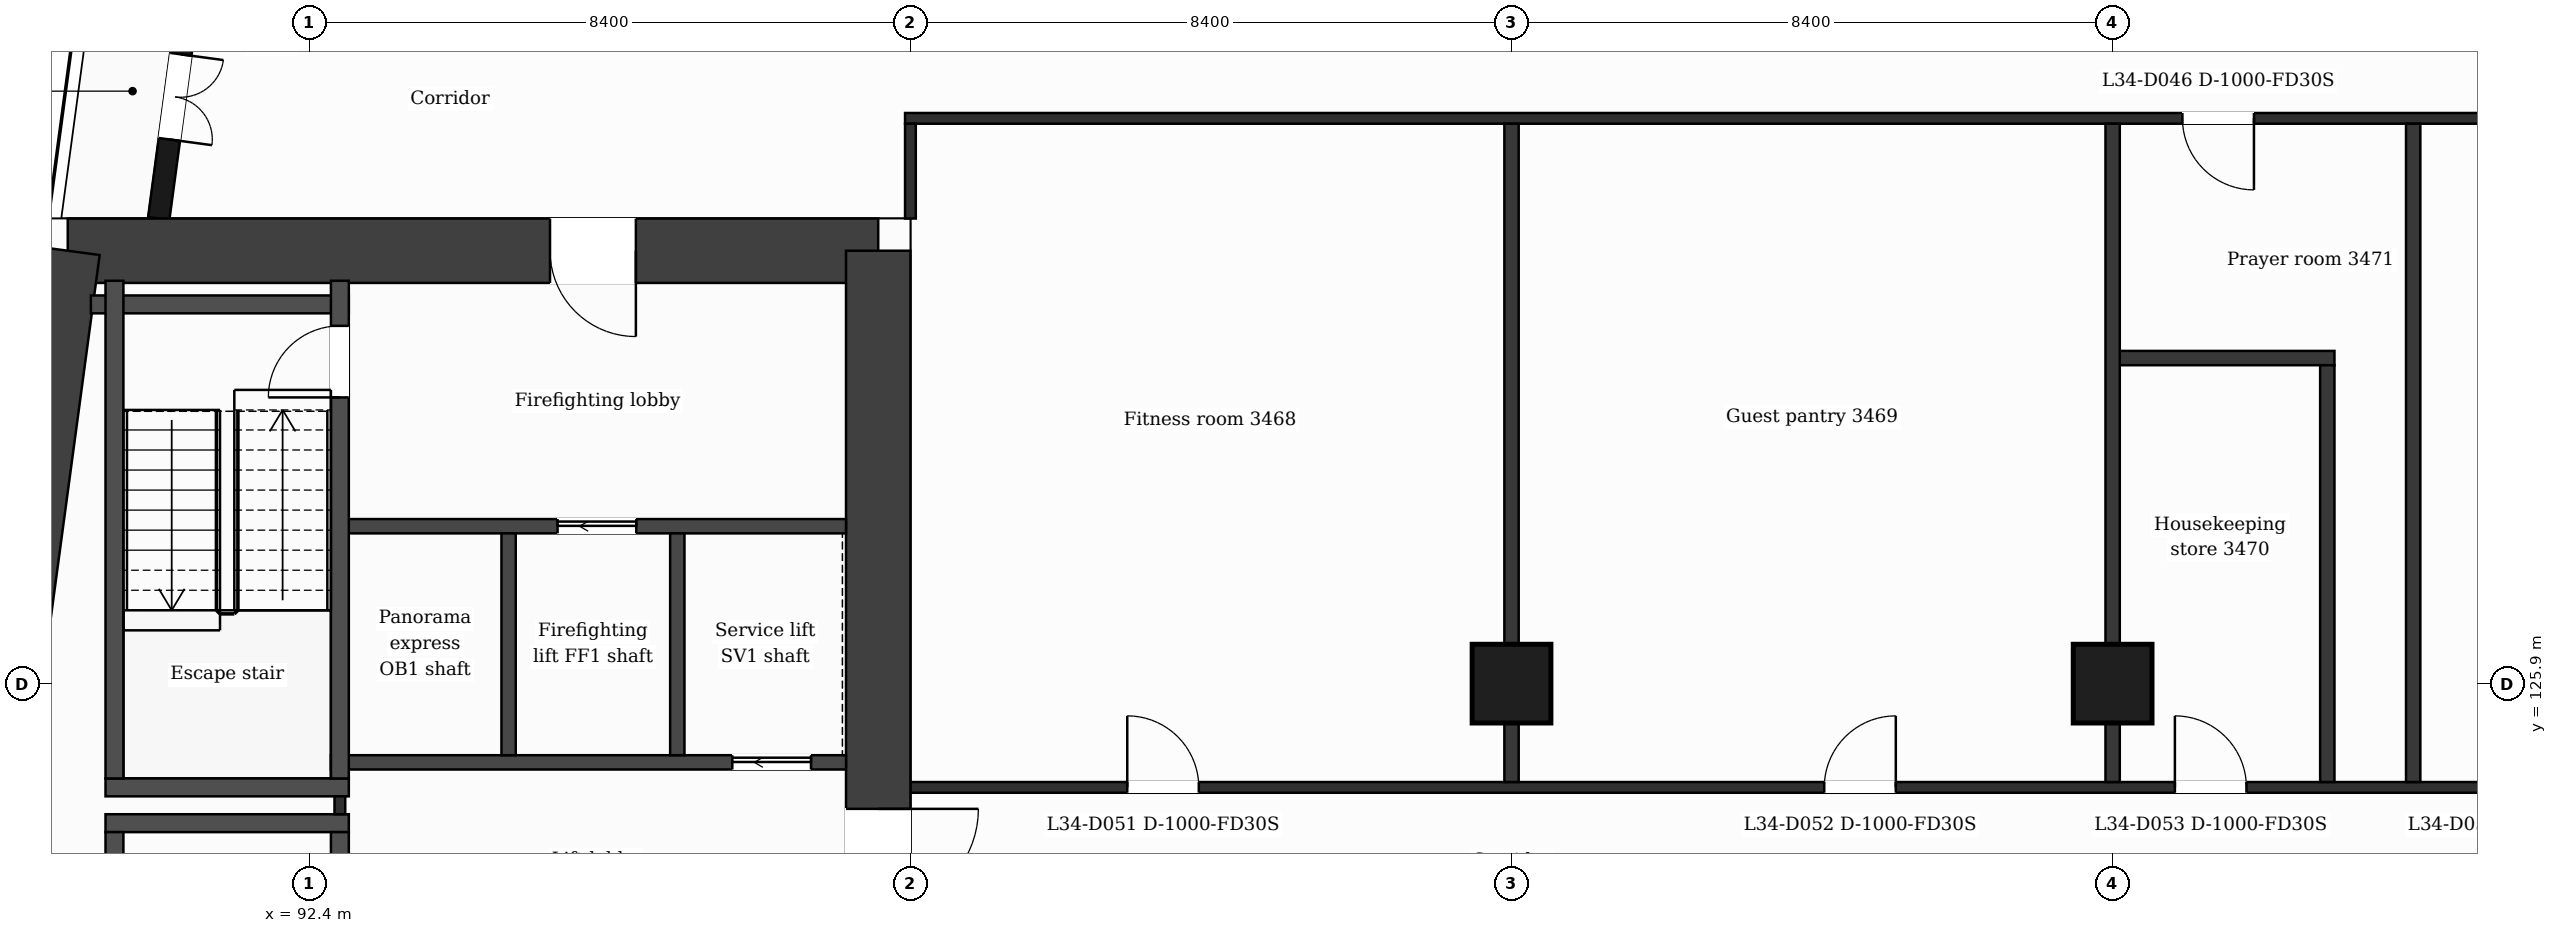
"""IFC4 building model, lengths in metres.
Left out: names, types, materials, properties, quantities, classifications, styles, units other than length and angle.
Written with IfcOpenShell. Run it as: python <this file> out.ifc"""

import sys

from ifc_helpers import new_model, si_unit, direction, frame, frame_2d, origin, origin_2d, place, context, subcontext, project, spatial, rectangle, extrude, element, fill, save


model = new_model("IFC4")
c1 = context("Model", 3, precision=1e-05, world=origin(), true_north=direction((0.0, 1.0)))
c2 = subcontext(c1, "Body", "Model", "MODEL_VIEW")
j1 = project(units=[si_unit("LENGTHUNIT", "METRE"), si_unit("PLANEANGLEUNIT", "RADIAN")], contexts=[c1])
p1 = place(None, origin())
s1 = spatial("IfcSite", under=j1, at=p1, CompositionType="ELEMENT")
p2 = place(p1, origin())
s2 = spatial("IfcBuilding", under=s1, at=p2, CompositionType="ELEMENT")
p3 = place(p2, frame((0.0, 0.0, 147.8)))
s3 = spatial("IfcBuildingStorey", under=s2, at=p3, CompositionType="ELEMENT", Elevation=147.8)
p4 = place(p3, frame((89.024, 131.95, 0.0), z_axis=(0.0, 0.0, 1.0), x_axis=(1.0, 0.0, 0.0)))
e1 = element("IfcWall", 1, at=p4, inside=s3, PredefinedType="SHEAR", context=c2, shape_type="SweptSolid", body=[
    extrude(rectangle(XDim=11.326, YDim=0.9, at=frame_2d((5.663, 0.0))), origin(), (0.0, 0.0, 1.0), 3.7),
])
p5 = place(p4, frame((6.739, 0.0, 0.0)))
e2 = element("IfcOpeningElement", 2, at=p5, cuts=e1, PredefinedType="OPENING", context=c2, shape_type="SweptSolid", body=[
    extrude(rectangle(XDim=1.2, YDim=2.1, at=frame_2d((0.6, 1.05))), frame((0.0, 0.46, 0.0), z_axis=(0.0, -1.0, 0.0), x_axis=(1.0, 0.0, 0.0)), (0.0, 0.0, 1.0), 0.92),
])
p6 = place(p3, frame((100.35, 131.95, 0.0), z_axis=(0.0, 0.0, 1.0), x_axis=(0.0, -1.0, 0.0)))
e3 = element("IfcWall", 3, at=p6, inside=s3, PredefinedType="SHEAR", context=c2, shape_type="SweptSolid", body=[
    extrude(rectangle(XDim=21.1, YDim=0.9, at=frame_2d((10.55, 0.0))), origin(), (0.0, 0.0, 1.0), 3.7),
])
p7 = place(p6, frame((7.8, 0.0, 0.0)))
e4 = element("IfcOpeningElement", 4, at=p7, cuts=e3, PredefinedType="OPENING", context=c2, shape_type="SweptSolid", body=[
    extrude(rectangle(XDim=1.4, YDim=2.1, at=frame_2d((0.7, 1.05))), frame((0.0, 0.46, 0.0), z_axis=(0.0, -1.0, 0.0), x_axis=(1.0, 0.0, 0.0)), (0.0, 0.0, 1.0), 0.92),
])
p8 = place(p3, frame((86.184, 110.85, 0.0), z_axis=(0.0, 0.0, 1.0), x_axis=(0.133410495943, 0.991060865725, 0.0)))
e5 = element("IfcWall", 5, at=p8, inside=s3, PredefinedType="SHEAR", context=c2, shape_type="SweptSolid", body=[
    extrude(rectangle(XDim=21.29, YDim=0.9, at=frame_2d((10.645, 0.0))), origin(), (0.0, 0.0, 1.0), 3.7),
])
for number, where, z_axis, x_axis in (
    (6, (109.2, 125.9, 0.0), (0.0, 0.0, 1.0), (1.0, 0.0, 0.0)),
    (7, (117.6, 125.9, 0.0), (0.0, 0.0, 1.0), (1.0, 0.0, 0.0)),
):
    element("IfcColumn", number, at=place(p3, frame(where, z_axis=z_axis, x_axis=x_axis)), inside=s3, PredefinedType="COLUMN", context=c2, shape_type="SweptSolid", body=[
        extrude(rectangle(XDim=1.1, YDim=1.1, at=origin_2d()), origin(), (0.0, 0.0, 1.0), 3.7),
    ])
p9 = place(p3, frame((91.177, 138.95, 0.0), z_axis=(0.0, 0.0, 1.0), x_axis=(-0.133426664613, -0.991058689065, 0.0)))
e8 = element("IfcWall", 8, at=p9, inside=s3, PredefinedType="SOLIDWALL", context=c2, shape_type="SweptSolid", body=[
    extrude(rectangle(XDim=6.609, YDim=0.3, at=frame_2d((3.305, 0.0))), origin(), (0.0, 0.0, 1.0), 3.38),
])
p10 = place(p9, frame((1.039, 0.0, 0.9)))
e9 = element("IfcOpeningElement", 9, at=p10, cuts=e8, PredefinedType="OPENING", context=c2, shape_type="SweptSolid", body=[
    extrude(rectangle(XDim=1.2, YDim=2.1, at=frame_2d((0.6, 1.05))), frame((0.0, 0.16, 0.0), z_axis=(0.0, -1.0, 0.0), x_axis=(1.0, 0.0, 0.0)), (0.0, 0.0, 1.0), 0.32),
])
p11 = place(p9, frame((4.294, 0.0, 0.0)))
e10 = element("IfcOpeningElement", 10, at=p11, cuts=e8, PredefinedType="OPENING", context=c2, shape_type="SweptSolid", body=[
    extrude(rectangle(XDim=1.2, YDim=2.4, at=frame_2d((0.6, 1.2))), frame((0.0, 0.16, 0.0), z_axis=(0.0, -1.0, 0.0), x_axis=(1.0, 0.0, 0.0)), (0.0, 0.0, 1.0), 0.32),
])
for number, where, z_axis, x_axis in (
    (11, (89.552, 123.95, 0.0), (0.0, 0.0, 1.0), (1.0, 0.0, 0.0)),
    (12, (89.552, 124.45, 0.0), (0.0, 0.0, 1.0), (1.0, 0.0, 0.0)),
):
    element("IfcWall", number, at=place(p3, frame(where, z_axis=z_axis, x_axis=x_axis)), inside=s3, PredefinedType="PARTITIONING", context=c2, shape_type="SweptSolid", body=[
        extrude(rectangle(XDim=3.4, YDim=0.25, at=frame_2d((1.7, 0.0))), origin(), (0.0, 0.0, 1.0), 3.38),
    ])
p12 = place(p3, frame((100.8, 124.45, 0.0), z_axis=(0.0, 0.0, 1.0), x_axis=(1.0, 0.0, 0.0)))
e13 = element("IfcWall", 13, at=p12, inside=s3, PredefinedType="PARTITIONING", context=c2, shape_type="SweptSolid", body=[
    extrude(rectangle(XDim=25.2, YDim=0.15, at=frame_2d((12.6, 0.0))), origin(), (0.0, 0.0, 1.0), 3.38),
])
p13 = place(p12, frame((3.03, 0.0, 0.0)))
e14 = element("IfcOpeningElement", 14, at=p13, cuts=e13, PredefinedType="OPENING", context=c2, shape_type="SweptSolid", body=[
    extrude(rectangle(XDim=1.0, YDim=2.1, at=frame_2d((0.5, 1.05))), frame((0.0, 0.085, 0.0), z_axis=(0.0, -1.0, 0.0), x_axis=(1.0, 0.0, 0.0)), (0.0, 0.0, 1.0), 0.17),
])
p14 = place(p12, frame((12.77, 0.0, 0.0)))
e15 = element("IfcOpeningElement", 15, at=p14, cuts=e13, PredefinedType="OPENING", context=c2, shape_type="SweptSolid", body=[
    extrude(rectangle(XDim=1.0, YDim=2.1, at=frame_2d((0.5, 1.05))), frame((0.0, 0.085, 0.0), z_axis=(0.0, -1.0, 0.0), x_axis=(1.0, 0.0, 0.0)), (0.0, 0.0, 1.0), 0.17),
])
p15 = place(p12, frame((17.67, 0.0, 0.0)))
e16 = element("IfcOpeningElement", 16, at=p15, cuts=e13, PredefinedType="OPENING", context=c2, shape_type="SweptSolid", body=[
    extrude(rectangle(XDim=1.0, YDim=2.1, at=frame_2d((0.5, 1.05))), frame((0.0, 0.085, 0.0), z_axis=(0.0, -1.0, 0.0), x_axis=(1.0, 0.0, 0.0)), (0.0, 0.0, 1.0), 0.17),
])
p16 = place(p12, frame((22.35, 0.0, 0.0)))
e17 = element("IfcOpeningElement", 17, at=p16, cuts=e13, PredefinedType="OPENING", context=c2, shape_type="SweptSolid", body=[
    extrude(rectangle(XDim=1.0, YDim=2.1, at=frame_2d((0.5, 1.05))), frame((0.0, 0.085, 0.0), z_axis=(0.0, -1.0, 0.0), x_axis=(1.0, 0.0, 0.0)), (0.0, 0.0, 1.0), 0.17),
])
p17 = place(p3, frame((92.702, 124.8, 0.0), z_axis=(0.0, 0.0, 1.0), x_axis=(1.0, 0.0, 0.0)))
e18 = element("IfcWall", 18, at=p17, inside=s3, PredefinedType="PARTITIONING", context=c2, shape_type="SweptSolid", body=[
    extrude(rectangle(XDim=7.198, YDim=0.2, at=frame_2d((3.599, 0.0))), origin(), (0.0, 0.0, 1.0), 3.38),
])
p18 = place(p17, frame((5.609, 0.0, 0.0)))
e19 = element("IfcOpeningElement", 19, at=p18, cuts=e18, PredefinedType="OPENING", context=c2, shape_type="SweptSolid", body=[
    extrude(rectangle(XDim=1.1, YDim=2.1, at=frame_2d((0.55, 1.05))), frame((0.0, 0.11, 0.0), z_axis=(0.0, -1.0, 0.0), x_axis=(1.0, 0.0, 0.0)), (0.0, 0.0, 1.0), 0.22),
])
p19 = place(p3, frame((92.827, 128.1, 0.0), z_axis=(0.0, 0.0, 1.0), x_axis=(1.0, 0.0, 0.0)))
e20 = element("IfcWall", 20, at=p19, inside=s3, PredefinedType="PARTITIONING", context=c2, shape_type="SweptSolid", body=[
    extrude(rectangle(XDim=7.073, YDim=0.2, at=frame_2d((3.537, 0.0))), origin(), (0.0, 0.0, 1.0), 3.38),
])
p20 = place(p19, frame((3.042, 0.0, 0.0)))
e21 = element("IfcOpeningElement", 21, at=p20, cuts=e20, PredefinedType="OPENING", context=c2, shape_type="SweptSolid", body=[
    extrude(rectangle(XDim=1.1, YDim=2.1, at=frame_2d((0.55, 1.05))), frame((0.0, 0.11, 0.0), z_axis=(0.0, -1.0, 0.0), x_axis=(1.0, 0.0, 0.0)), (0.0, 0.0, 1.0), 0.22),
])
p21 = place(p3, frame((117.6, 130.45, 0.0), z_axis=(0.0, 0.0, 1.0), x_axis=(1.0, 0.0, 0.0)))
e22 = element("IfcWall", 22, at=p21, inside=s3, PredefinedType="PARTITIONING", context=c2, shape_type="SweptSolid", body=[
    extrude(rectangle(XDim=3.1, YDim=0.2, at=frame_2d((1.55, 0.0))), origin(), (0.0, 0.0, 1.0), 3.38),
])
p22 = place(p3, frame((89.347, 131.2, 0.0), z_axis=(0.0, 0.0, 1.0), x_axis=(1.0, 0.0, 0.0)))
e23 = element("IfcWall", 23, at=p22, inside=s3, PredefinedType="PARTITIONING", context=c2, shape_type="SweptSolid", body=[
    extrude(rectangle(XDim=3.604, YDim=0.25, at=frame_2d((1.802, 0.0))), origin(), (0.0, 0.0, 1.0), 3.38),
])
p23 = place(p3, frame((100.725, 133.8, 0.0), z_axis=(0.0, 0.0, 1.0), x_axis=(1.0, 0.0, 0.0)))
e24 = element("IfcWall", 24, at=p23, inside=s3, PredefinedType="PARTITIONING", context=c2, shape_type="SweptSolid", body=[
    extrude(rectangle(XDim=25.35, YDim=0.15, at=frame_2d((12.675, 0.0))), origin(), (0.0, 0.0, 1.0), 3.38),
])
p24 = place(p23, frame((17.85, 0.0, 0.0)))
e25 = element("IfcOpeningElement", 25, at=p24, cuts=e24, PredefinedType="OPENING", context=c2, shape_type="SweptSolid", body=[
    extrude(rectangle(XDim=1.0, YDim=2.1, at=frame_2d((0.5, 1.05))), frame((0.0, 0.085, 0.0), z_axis=(0.0, -1.0, 0.0), x_axis=(1.0, 0.0, 0.0)), (0.0, 0.0, 1.0), 0.17),
])
p25 = place(p3, frame((89.677, 116.87, 0.0), z_axis=(0.0, 0.0, 1.0), x_axis=(0.0, 1.0, 0.0)))
e26 = element("IfcWall", 26, at=p25, inside=s3, PredefinedType="PARTITIONING", context=c2, shape_type="SweptSolid", body=[
    extrude(rectangle(XDim=6.955, YDim=0.25, at=frame_2d((3.478, 0.0))), origin(), (0.0, 0.0, 1.0), 3.38),
])
p26 = place(p3, frame((89.677, 124.575, 0.0), z_axis=(0.0, 0.0, 1.0), x_axis=(0.0, 1.0, 0.0)))
e27 = element("IfcWall", 27, at=p26, inside=s3, PredefinedType="PARTITIONING", context=c2, shape_type="SweptSolid", body=[
    extrude(rectangle(XDim=6.955, YDim=0.25, at=frame_2d((3.478, 0.0))), origin(), (0.0, 0.0, 1.0), 3.38),
])
p27 = place(p3, frame((92.827, 124.075, 0.0), z_axis=(0.0, 0.0, 1.0), x_axis=(0.0, 1.0, 0.0)))
e28 = element("IfcWall", 28, at=p27, inside=s3, PredefinedType="PARTITIONING", context=c2, shape_type="SweptSolid", body=[
    extrude(rectangle(XDim=0.25, YDim=0.15, at=frame_2d((0.125, 0.0))), origin(), (0.0, 0.0, 1.0), 3.38),
])
p28 = place(p3, frame((92.827, 116.87, 0.0), z_axis=(0.0, 0.0, 1.0), x_axis=(0.0, 1.0, 0.0)))
e29 = element("IfcWall", 29, at=p28, inside=s3, PredefinedType="PARTITIONING", context=c2, shape_type="SweptSolid", body=[
    extrude(rectangle(XDim=6.955, YDim=0.25, at=frame_2d((3.478, 0.0))), origin(), (0.0, 0.0, 1.0), 3.38),
])
p29 = place(p28, frame((5.655, 0.0, 0.0)))
e30 = element("IfcOpeningElement", 30, at=p29, cuts=e29, PredefinedType="OPENING", context=c2, shape_type="SweptSolid", body=[
    extrude(rectangle(XDim=0.95, YDim=2.1, at=frame_2d((0.475, 1.05))), frame((0.0, 0.135, 0.0), z_axis=(0.0, -1.0, 0.0), x_axis=(1.0, 0.0, 0.0)), (0.0, 0.0, 1.0), 0.27),
])
p30 = place(p3, frame((92.827, 124.575, 0.0), z_axis=(0.0, 0.0, 1.0), x_axis=(0.0, 1.0, 0.0)))
e31 = element("IfcWall", 31, at=p30, inside=s3, PredefinedType="PARTITIONING", context=c2, shape_type="SweptSolid", body=[
    extrude(rectangle(XDim=6.955, YDim=0.25, at=frame_2d((3.478, 0.0))), origin(), (0.0, 0.0, 1.0), 3.38),
])
p31 = place(p30, frame((5.325, 0.0, 0.0)))
e32 = element("IfcOpeningElement", 32, at=p31, cuts=e31, PredefinedType="OPENING", context=c2, shape_type="SweptSolid", body=[
    extrude(rectangle(XDim=1.0, YDim=2.1, at=frame_2d((0.5, 1.05))), frame((0.0, 0.135, 0.0), z_axis=(0.0, -1.0, 0.0), x_axis=(1.0, 0.0, 0.0)), (0.0, 0.0, 1.0), 0.27),
])
for number, where, z_axis, x_axis in (
    (33, (95.185, 124.9, 0.0), (0.0, 0.0, 1.0), (0.0, 1.0, 0.0)),
    (34, (97.542, 124.9, 0.0), (0.0, 0.0, 1.0), (0.0, 1.0, 0.0)),
):
    element("IfcWall", number, at=place(p3, frame(where, z_axis=z_axis, x_axis=x_axis)), inside=s3, PredefinedType="PARTITIONING", context=c2, shape_type="SweptSolid", body=[
        extrude(rectangle(XDim=3.1, YDim=0.2, at=frame_2d((1.55, 0.0))), origin(), (0.0, 0.0, 1.0), 3.38),
    ])
p32 = place(p3, frame((100.8, 132.4, 0.0), z_axis=(0.0, 0.0, 1.0), x_axis=(0.0, 1.0, 0.0)))
e35 = element("IfcWall", 35, at=p32, inside=s3, PredefinedType="PARTITIONING", context=c2, shape_type="SweptSolid", body=[
    extrude(rectangle(XDim=1.325, YDim=0.15, at=frame_2d((0.663, 0.0))), origin(), (0.0, 0.0, 1.0), 3.38),
])
for number, where, z_axis, x_axis in (
    (36, (109.2, 124.525, 0.0), (0.0, 0.0, 1.0), (0.0, 1.0, 0.0)),
    (37, (117.6, 124.525, 0.0), (0.0, 0.0, 1.0), (0.0, 1.0, 0.0)),
):
    element("IfcWall", number, at=place(p3, frame(where, z_axis=z_axis, x_axis=x_axis)), inside=s3, PredefinedType="PARTITIONING", context=c2, shape_type="SweptSolid", body=[
        extrude(rectangle(XDim=9.2, YDim=0.2, at=frame_2d((4.6, 0.0))), origin(), (0.0, 0.0, 1.0), 3.38),
    ])
p33 = place(p3, frame((120.6, 124.525, 0.0), z_axis=(0.0, 0.0, 1.0), x_axis=(0.0, 1.0, 0.0)))
e38 = element("IfcWall", 38, at=p33, inside=s3, PredefinedType="PARTITIONING", context=c2, shape_type="SweptSolid", body=[
    extrude(rectangle(XDim=5.825, YDim=0.2, at=frame_2d((2.913, 0.0))), origin(), (0.0, 0.0, 1.0), 3.38),
])
p34 = place(p3, frame((121.8, 124.525, 0.0), z_axis=(0.0, 0.0, 1.0), x_axis=(0.0, 1.0, 0.0)))
e39 = element("IfcWall", 39, at=p34, inside=s3, PredefinedType="PARTITIONING", context=c2, shape_type="SweptSolid", body=[
    extrude(rectangle(XDim=9.2, YDim=0.2, at=frame_2d((4.6, 0.0))), origin(), (0.0, 0.0, 1.0), 3.38),
])
p35 = place(p11, origin())
e40 = element("IfcDoor", 40, at=p35, inside=s3, OperationType="DOUBLE_DOOR_SINGLE_SWING", PredefinedType="DOOR", context=c2, shape_type="SweptSolid", body=[
    extrude(rectangle(XDim=1.2, YDim=2.4, at=frame_2d((0.6, 1.2))), frame((0.0, 0.025, 0.0), z_axis=(0.0, -1.0, 0.0), x_axis=(1.0, 0.0, 0.0)), (0.0, 0.0, 1.0), 0.05),
])
fill(e10, e40)
p36 = place(p20, origin())
e41 = element("IfcDoor", 41, at=p36, inside=s3, OperationType="SLIDING_TO_LEFT", PredefinedType="DOOR", context=c2, shape_type="SweptSolid", body=[
    extrude(rectangle(XDim=1.1, YDim=2.1, at=frame_2d((0.55, 1.05))), frame((0.0, 0.025, 0.0), z_axis=(0.0, -1.0, 0.0), x_axis=(1.0, 0.0, 0.0)), (0.0, 0.0, 1.0), 0.05),
])
fill(e21, e41)
p37 = place(p18, origin())
e42 = element("IfcDoor", 42, at=p37, inside=s3, OperationType="SLIDING_TO_LEFT", PredefinedType="DOOR", context=c2, shape_type="SweptSolid", body=[
    extrude(rectangle(XDim=1.1, YDim=2.1, at=frame_2d((0.55, 1.05))), frame((0.0, 0.025, 0.0), z_axis=(0.0, -1.0, 0.0), x_axis=(1.0, 0.0, 0.0)), (0.0, 0.0, 1.0), 0.05),
])
fill(e19, e42)
p38 = place(p31, origin())
e43 = element("IfcDoor", 43, at=p38, inside=s3, OperationType="SINGLE_SWING_LEFT", PredefinedType="DOOR", context=c2, shape_type="SweptSolid", body=[
    extrude(rectangle(XDim=1.0, YDim=2.1, at=frame_2d((0.5, 1.05))), frame((0.0, 0.025, 0.0), z_axis=(0.0, -1.0, 0.0), x_axis=(1.0, 0.0, 0.0)), (0.0, 0.0, 1.0), 0.05),
])
fill(e32, e43)
p39 = place(p24, origin())
e44 = element("IfcDoor", 44, at=p39, inside=s3, OperationType="SINGLE_SWING_RIGHT", PredefinedType="DOOR", context=c2, shape_type="SweptSolid", body=[
    extrude(rectangle(XDim=1.0, YDim=2.1, at=frame_2d((0.5, 1.05))), frame((0.0, 0.025, 0.0), z_axis=(0.0, -1.0, 0.0), x_axis=(1.0, 0.0, 0.0)), (0.0, 0.0, 1.0), 0.05),
])
fill(e25, e44)
p40 = place(p13, origin())
e45 = element("IfcDoor", 45, at=p40, inside=s3, OperationType="SINGLE_SWING_LEFT", PredefinedType="DOOR", context=c2, shape_type="SweptSolid", body=[
    extrude(rectangle(XDim=1.0, YDim=2.1, at=frame_2d((0.5, 1.05))), frame((0.0, 0.025, 0.0), z_axis=(0.0, -1.0, 0.0), x_axis=(1.0, 0.0, 0.0)), (0.0, 0.0, 1.0), 0.05),
])
fill(e14, e45)
p41 = place(p14, origin())
e46 = element("IfcDoor", 46, at=p41, inside=s3, OperationType="SINGLE_SWING_RIGHT", PredefinedType="DOOR", context=c2, shape_type="SweptSolid", body=[
    extrude(rectangle(XDim=1.0, YDim=2.1, at=frame_2d((0.5, 1.05))), frame((0.0, 0.025, 0.0), z_axis=(0.0, -1.0, 0.0), x_axis=(1.0, 0.0, 0.0)), (0.0, 0.0, 1.0), 0.05),
])
fill(e15, e46)
p42 = place(p15, origin())
e47 = element("IfcDoor", 47, at=p42, inside=s3, OperationType="SINGLE_SWING_LEFT", PredefinedType="DOOR", context=c2, shape_type="SweptSolid", body=[
    extrude(rectangle(XDim=1.0, YDim=2.1, at=frame_2d((0.5, 1.05))), frame((0.0, 0.025, 0.0), z_axis=(0.0, -1.0, 0.0), x_axis=(1.0, 0.0, 0.0)), (0.0, 0.0, 1.0), 0.05),
])
fill(e16, e47)
p43 = place(p5, origin())
e48 = element("IfcDoor", 48, at=p43, inside=s3, OperationType="SINGLE_SWING_RIGHT", PredefinedType="DOOR", context=c2, shape_type="SweptSolid", body=[
    extrude(rectangle(XDim=1.2, YDim=2.1, at=frame_2d((0.6, 1.05))), frame((0.0, 0.025, 0.0), z_axis=(0.0, -1.0, 0.0), x_axis=(1.0, 0.0, 0.0)), (0.0, 0.0, 1.0), 0.05),
])
fill(e2, e48)
p44 = place(p7, origin())
e49 = element("IfcDoor", 49, at=p44, inside=s3, OperationType="SINGLE_SWING_LEFT", PredefinedType="DOOR", context=c2, shape_type="SweptSolid", body=[
    extrude(rectangle(XDim=1.4, YDim=2.1, at=frame_2d((0.7, 1.05))), frame((0.0, 0.025, 0.0), z_axis=(0.0, -1.0, 0.0), x_axis=(1.0, 0.0, 0.0)), (0.0, 0.0, 1.0), 0.05),
])
fill(e4, e49)
save(model, sys.argv[1])
